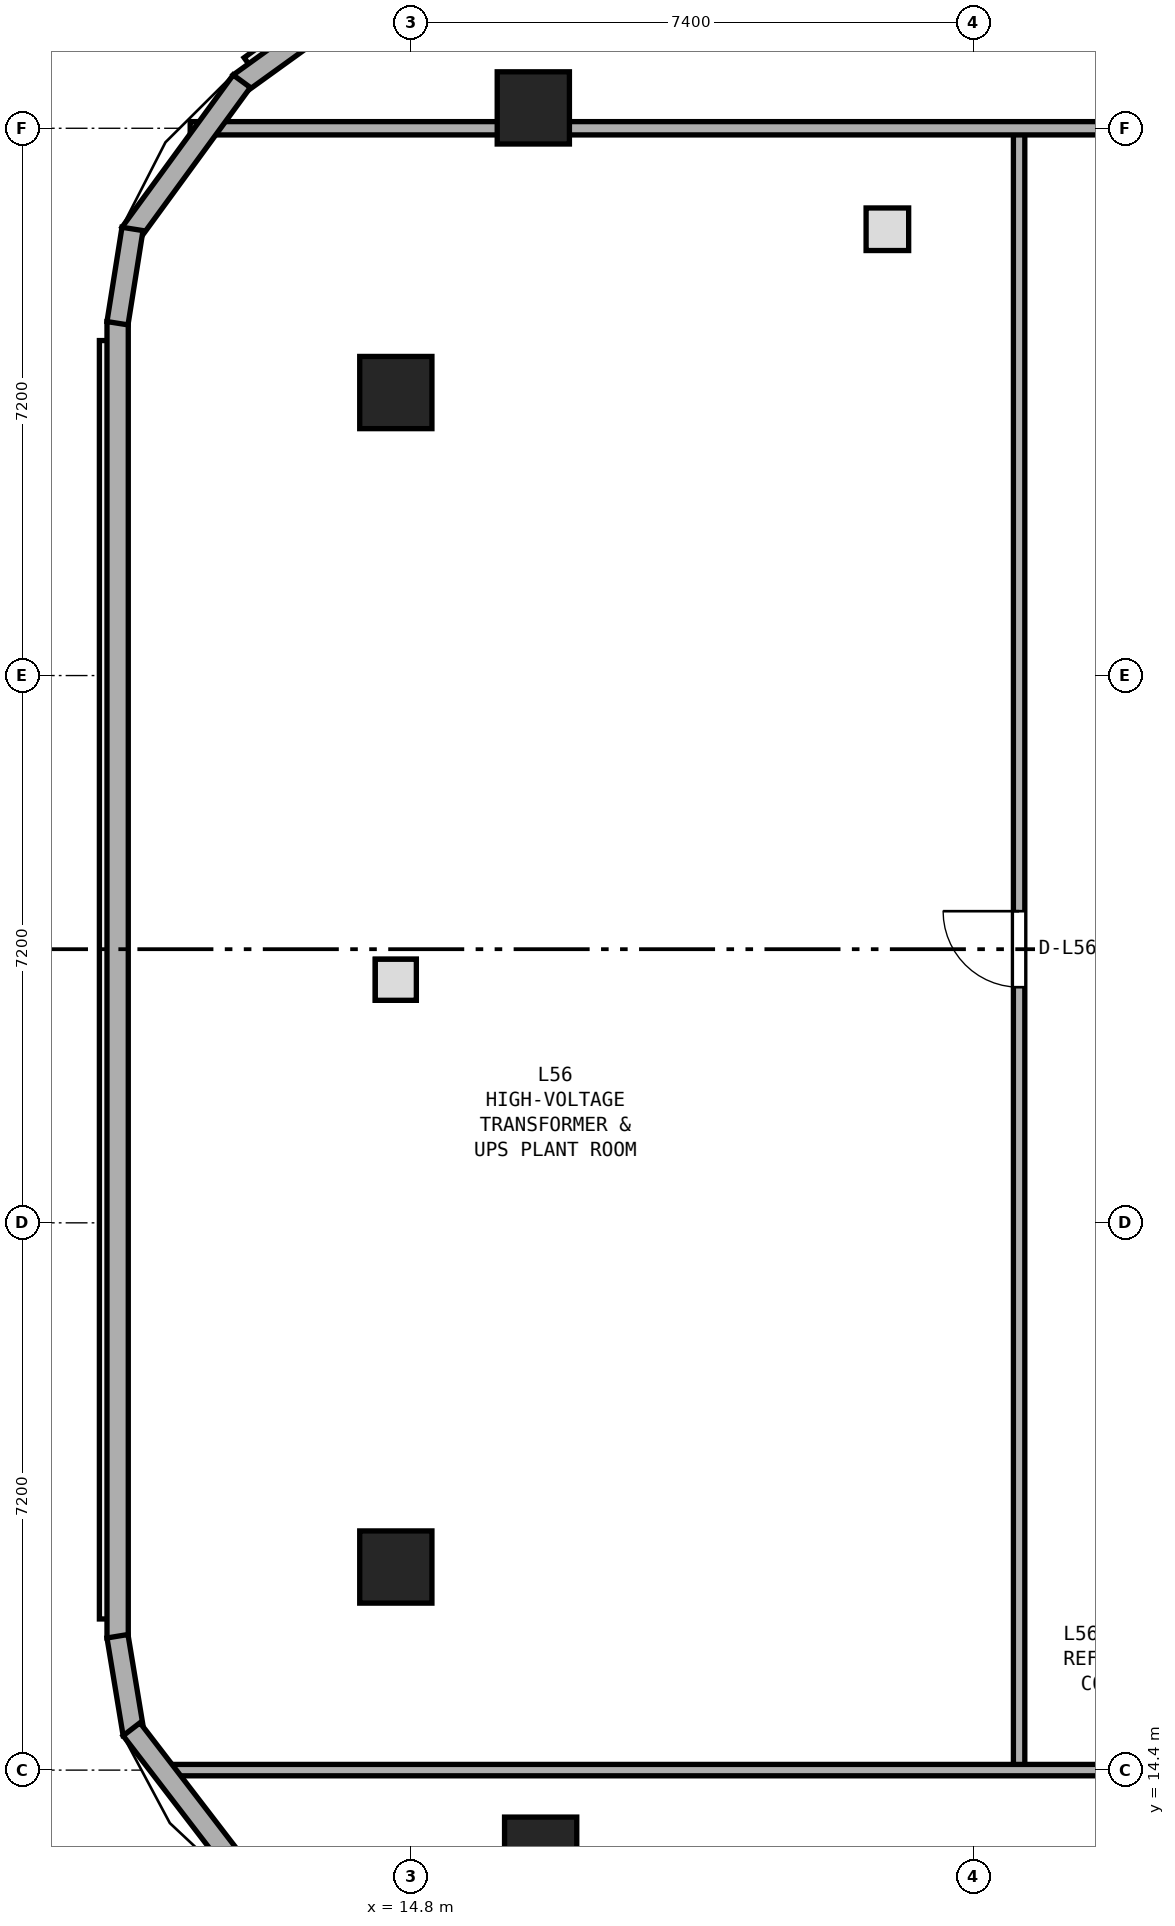
"""IFC4 building model, lengths in metres.
Left out: names, types, materials, properties, quantities, classifications, styles, units other than length and angle.
Written with IfcOpenShell. Run it as: python <this file> out.ifc"""

import sys

from ifc_helpers import new_model, si_unit, direction, frame, frame_2d, origin, origin_2d, place, context, subcontext, project, spatial, rectangle, extrude, element, fill, save


model = new_model("IFC4")
c1 = context("Model", 3, precision=1e-05, world=origin(), true_north=direction((0.0, 1.0)))
c2 = subcontext(c1, "Body", "Model", "MODEL_VIEW")
j1 = project(units=[si_unit("LENGTHUNIT", "METRE"), si_unit("PLANEANGLEUNIT", "RADIAN")], contexts=[c1])
p1 = place(None, origin())
s1 = spatial("IfcSite", under=j1, at=p1, CompositionType="ELEMENT")
p2 = place(p1, origin())
s2 = spatial("IfcBuilding", under=s1, at=p2, CompositionType="ELEMENT")
p3 = place(p2, frame((0.0, 0.0, 220.0)))
s3 = spatial("IfcBuildingStorey", under=s2, at=p3, CompositionType="ELEMENT", Elevation=220.0)
for number, where, z_axis, x_axis in (
    (1, (16.409, 36.268, 0.0), (0.0, 0.0, 1.0), (1.0, 0.0, 0.0)),
    (2, (14.6, 32.523, 0.0), (0.0, 0.0, 1.0), (1.0, 0.0, 0.0)),
    (3, (14.6, 17.072, 0.0), (0.0, 0.0, 1.0), (1.0, 0.0, 0.0)),
    (4, (16.505, 13.307, 0.0), (0.0, 0.0, 1.0), (1.0, 0.0, 0.0)),
):
    element("IfcColumn", number, at=place(p3, frame(where, z_axis=z_axis, x_axis=x_axis)), inside=s3, PredefinedType="COLUMN", context=c2, shape_type="SweptSolid", body=[
        extrude(rectangle(XDim=0.95, YDim=0.95, at=origin_2d()), origin(), (0.0, 0.0, 1.0), 5.0),
    ])
p4 = place(p3, frame((22.8, 14.4, 0.0), z_axis=(0.0, 0.0, 1.0), x_axis=(0.0, 1.0, 0.0)))
e5 = element("IfcWall", 5, at=p4, inside=s3, PredefinedType="PARTITIONING", context=c2, shape_type="SweptSolid", body=[
    extrude(rectangle(XDim=21.6, YDim=0.15, at=frame_2d((10.8, 0.0))), origin(), (0.0, 0.0, 1.0), 4.71),
])
p5 = place(p4, frame((10.3, 0.0, 0.0)))
e6 = element("IfcOpeningElement", 6, at=p5, cuts=e5, PredefinedType="OPENING", context=c2, shape_type="SweptSolid", body=[
    extrude(rectangle(XDim=1.0, YDim=2.04, at=frame_2d((0.5, 1.02))), frame((0.0, 0.085, 0.0), z_axis=(0.0, -1.0, 0.0), x_axis=(1.0, 0.0, 0.0)), (0.0, 0.0, 1.0), 0.17),
])
p6 = place(p3, frame((11.459, 14.4, 0.0), z_axis=(0.0, 0.0, 1.0), x_axis=(1.0, 0.0, 0.0)))
e7 = element("IfcWall", 7, at=p6, inside=s3, PredefinedType="PARTITIONING", context=c2, shape_type="SweptSolid", body=[
    extrude(rectangle(XDim=52.619, YDim=0.15, at=frame_2d((26.31, 0.0))), origin(), (0.0, 0.0, 1.0), 2.31),
])
p7 = place(p6, frame((25.041, 0.0, 0.0)))
e8 = element("IfcOpeningElement", 8, at=p7, cuts=e7, PredefinedType="OPENING", context=c2, shape_type="SweptSolid", body=[
    extrude(rectangle(XDim=1.0, YDim=2.04, at=frame_2d((0.5, 1.02))), frame((0.0, 0.085, 0.0), z_axis=(0.0, -1.0, 0.0), x_axis=(1.0, 0.0, 0.0)), (0.0, 0.0, 1.0), 0.17),
])
p8 = place(p3, frame((11.895, 36.0, 0.0), z_axis=(0.0, 0.0, 1.0), x_axis=(1.0, 0.0, 0.0)))
e9 = element("IfcWall", 9, at=p8, inside=s3, PredefinedType="PARTITIONING", context=c2, shape_type="SweptSolid", body=[
    extrude(rectangle(XDim=52.603, YDim=0.175, at=frame_2d((26.301, 0.0))), origin(), (0.0, 0.0, 1.0), 2.31),
])
p9 = place(p8, frame((24.605, 0.0, 0.0)))
e10 = element("IfcOpeningElement", 10, at=p9, cuts=e9, PredefinedType="OPENING", context=c2, shape_type="SweptSolid", body=[
    extrude(rectangle(XDim=1.0, YDim=2.04, at=frame_2d((0.5, 1.02))), frame((0.0, 0.097, 0.0), z_axis=(0.0, -1.0, 0.0), x_axis=(1.0, 0.0, 0.0)), (0.0, 0.0, 1.0), 0.195),
])
p10 = place(p3, frame((26.703, 46.803, 0.0), z_axis=(0.0, 0.0, 1.0), x_axis=(-0.811009447916, -0.585033054956, 0.0)))
e11 = element("IfcWall", 11, at=p10, inside=s3, PredefinedType="STANDARD", context=c2, shape_type="SweptSolid", body=[
    extrude(rectangle(XDim=17.461, YDim=0.28, at=frame_2d((8.73, 0.0))), origin(), (0.0, 0.0, 1.0), 4.71),
])
p11 = place(p3, frame((10.94, 33.457, 0.0), z_axis=(0.0, 0.0, 1.0), x_axis=(0.0, -1.0, 0.0)))
e12 = element("IfcWall", 12, at=p11, inside=s3, PredefinedType="STANDARD", context=c2, shape_type="SweptSolid", body=[
    extrude(rectangle(XDim=17.319, YDim=0.28, at=frame_2d((8.659, 0.0))), origin(), (0.0, 0.0, 1.0), 2.31),
])
p12 = place(p3, frame((12.573, 36.619, 0.0), z_axis=(0.0, 0.0, 1.0), x_axis=(-0.589604441083, -0.807692146214, 0.0)))
e13 = element("IfcWall", 13, at=p12, inside=s3, PredefinedType="STANDARD", context=c2, shape_type="SweptSolid", body=[
    extrude(rectangle(XDim=2.481, YDim=0.28, at=frame_2d((1.24, 0.0))), origin(), (0.0, 0.0, 1.0), 4.71),
])
p13 = place(p3, frame((11.135, 34.676, 0.0), z_axis=(0.0, 0.0, 1.0), x_axis=(-0.157050421819, -0.987590585722, 0.0)))
e14 = element("IfcWall", 14, at=p13, inside=s3, PredefinedType="STANDARD", context=c2, shape_type="SweptSolid", body=[
    extrude(rectangle(XDim=1.256, YDim=0.28, at=frame_2d((0.628, 0.0))), origin(), (0.0, 0.0, 1.0), 4.71),
])
p14 = place(p3, frame((10.938, 16.161, 0.0), z_axis=(0.0, 0.0, 1.0), x_axis=(0.162940994575, -0.986635815429, 0.0)))
e15 = element("IfcWall", 15, at=p14, inside=s3, PredefinedType="STANDARD", context=c2, shape_type="SweptSolid", body=[
    extrude(rectangle(XDim=1.303, YDim=0.28, at=frame_2d((0.652, 0.0))), origin(), (0.0, 0.0, 1.0), 4.71),
])
p15 = place(p3, frame((11.124, 14.938, 0.0), z_axis=(0.0, 0.0, 1.0), x_axis=(0.608847960063, -0.79328693518, 0.0)))
e16 = element("IfcWall", 16, at=p15, inside=s3, PredefinedType="STANDARD", context=c2, shape_type="SweptSolid", body=[
    extrude(rectangle(XDim=2.572, YDim=0.28, at=frame_2d((1.286, 0.0))), origin(), (0.0, 0.0, 1.0), 4.71),
])
p16 = place(p5, origin())
e17 = element("IfcDoor", 17, at=p16, inside=s3, OperationType="SINGLE_SWING_RIGHT", PredefinedType="DOOR", context=c2, shape_type="SweptSolid", body=[
    extrude(rectangle(XDim=1.0, YDim=2.04, at=frame_2d((0.5, 1.02))), frame((0.0, 0.025, 0.0), z_axis=(0.0, -1.0, 0.0), x_axis=(1.0, 0.0, 0.0)), (0.0, 0.0, 1.0), 0.05),
])
fill(e6, e17)
save(model, sys.argv[1])
